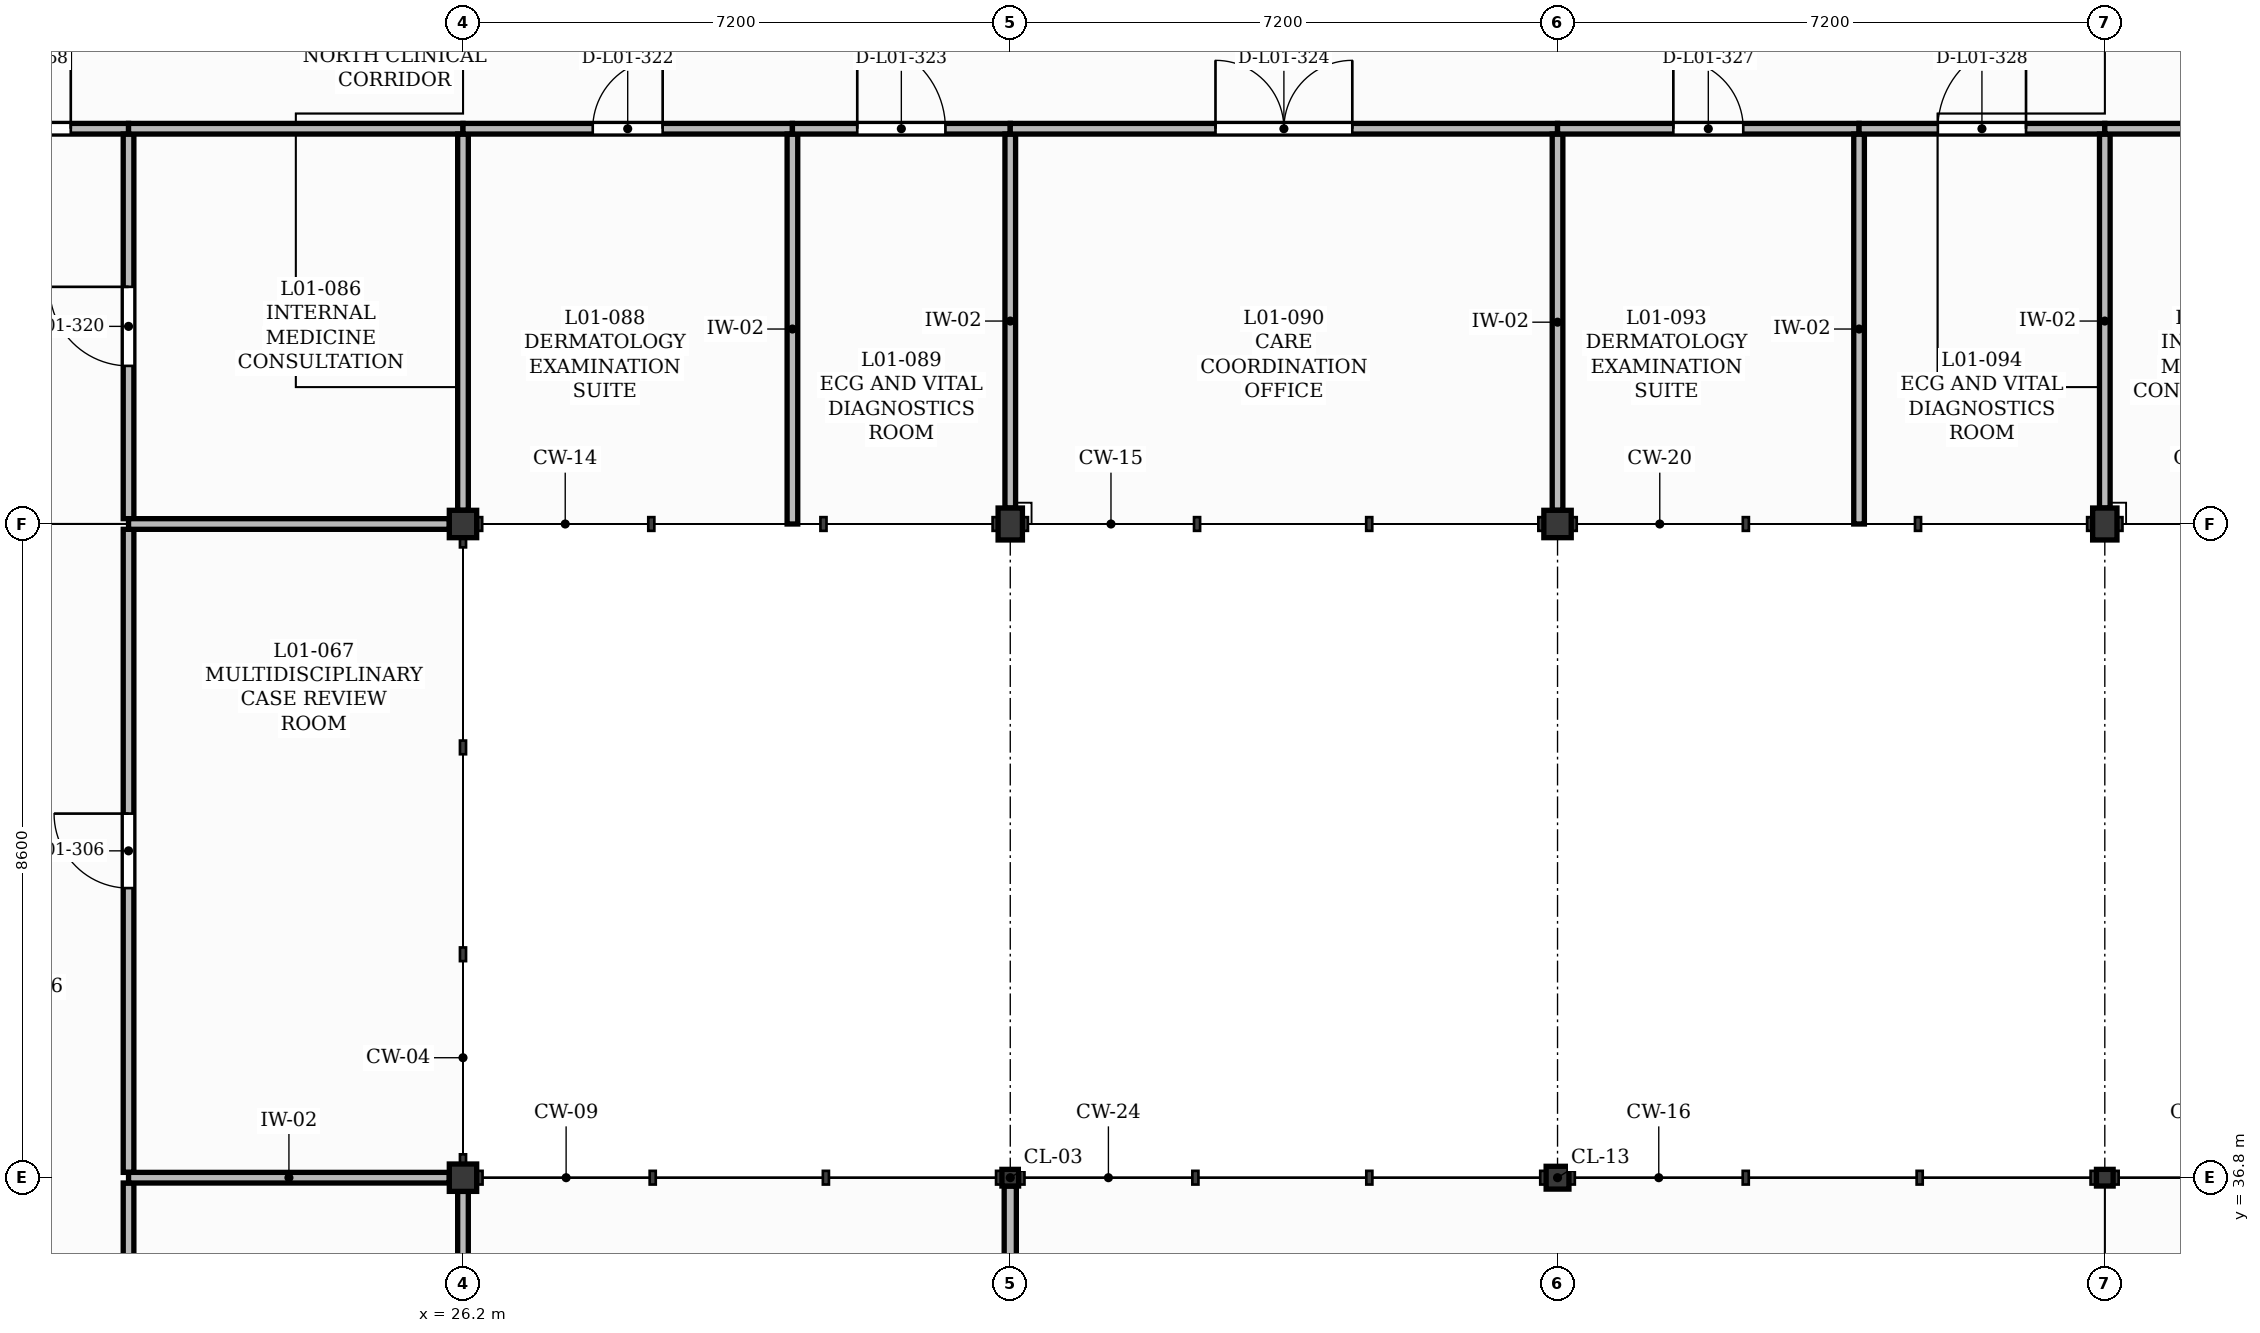
"""IFC4 building model, lengths in metres.
Left out: names, types, materials, properties, quantities, classifications, styles, units other than length and angle.
Written with IfcOpenShell. Run it as: python <this file> out.ifc"""

import sys

from ifc_helpers import new_model, si_unit, direction, frame, frame_2d, origin, origin_2d, place, context, subcontext, project, spatial, rectangle, hollow_circle, i_section, extrude, element, fill, save


model = new_model("IFC4")
c1 = context("Model", 3, precision=1e-05, world=origin(), true_north=direction((0.0, 1.0)))
c2 = subcontext(c1, "Body", "Model", "MODEL_VIEW")
j1 = project(units=[si_unit("LENGTHUNIT", "METRE"), si_unit("PLANEANGLEUNIT", "RADIAN")], contexts=[c1])
p1 = place(None, origin())
s1 = spatial("IfcSite", under=j1, at=p1, CompositionType="ELEMENT")
p2 = place(p1, origin())
s2 = spatial("IfcBuilding", under=s1, at=p2, CompositionType="ELEMENT")
p3 = place(p2, frame((0.0, 0.0, 4.5)))
s3 = spatial("IfcBuildingStorey", under=s2, at=p3, CompositionType="ELEMENT", Elevation=4.5)
for number, where, z_axis, x_axis in (
    (1, (26.2, 36.8, 0.0), (0.0, 0.0, 1.0), (1.0, 0.0, 0.0)),
    (2, (26.2, 45.4, 0.0), (0.0, 0.0, 1.0), (1.0, 0.0, 0.0)),
):
    element("IfcColumn", number, at=place(p3, frame(where, z_axis=z_axis, x_axis=x_axis)), inside=s3, PredefinedType="COLUMN", context=c2, shape_type="SweptSolid", body=[
        extrude(rectangle(XDim=0.36, YDim=0.36, at=origin_2d()), origin(), (0.0, 0.0, 1.0), 4.26),
    ])
p4 = place(p3, frame((33.4, 36.8, 0.0), z_axis=(0.0, 0.0, 1.0), x_axis=(1.0, 0.0, 0.0)))
e3 = element("IfcColumn", 3, at=p4, inside=s3, PredefinedType="COLUMN", context=c2, shape_type="SweptSolid", body=[
    extrude(hollow_circle(Radius=0.11, WallThickness=0.01, at=origin_2d()), origin(), (0.0, 0.0, 1.0), 4.3),
])
p5 = place(p3, frame((33.4, 45.4, 0.0), z_axis=(0.0, 0.0, 1.0), x_axis=(1.0, 0.0, 0.0)))
e4 = element("IfcColumn", 4, at=p5, inside=s3, PredefinedType="COLUMN", context=c2, shape_type="SweptSolid", body=[
    extrude(rectangle(XDim=0.32, YDim=0.42, at=origin_2d()), origin(), (0.0, 0.0, 1.0), 4.26),
])
p6 = place(p3, frame((40.6, 36.8, 0.0), z_axis=(0.0, 0.0, 1.0), x_axis=(1.0, 0.0, 0.0)))
e5 = element("IfcColumn", 5, at=p6, inside=s3, PredefinedType="COLUMN", context=c2, shape_type="SweptSolid", body=[
    extrude(i_section(OverallWidth=0.3, OverallDepth=0.3, WebThickness=0.011, FlangeThickness=0.019, FilletRadius=0.027, at=origin_2d()), origin(), (0.0, 0.0, 1.0), 4.3),
])
p7 = place(p3, frame((40.6, 45.4, 0.0), z_axis=(0.0, 0.0, 1.0), x_axis=(1.0, 0.0, 0.0)))
e6 = element("IfcColumn", 6, at=p7, inside=s3, PredefinedType="COLUMN", context=c2, shape_type="SweptSolid", body=[
    extrude(rectangle(XDim=0.36, YDim=0.36, at=origin_2d()), origin(), (0.0, 0.0, 1.0), 4.26),
])
p8 = place(p3, frame((47.8, 36.8, 0.0), z_axis=(0.0, 0.0, 1.0), x_axis=(1.0, 0.0, 0.0)))
e7 = element("IfcColumn", 7, at=p8, inside=s3, PredefinedType="COLUMN", context=c2, shape_type="SweptSolid", body=[
    extrude(hollow_circle(Radius=0.11, WallThickness=0.01, at=origin_2d()), origin(), (0.0, 0.0, 1.0), 4.3),
])
p9 = place(p3, frame((47.8, 45.4, 0.0), z_axis=(0.0, 0.0, 1.0), x_axis=(1.0, 0.0, 0.0)))
e8 = element("IfcColumn", 8, at=p9, inside=s3, PredefinedType="COLUMN", context=c2, shape_type="SweptSolid", body=[
    extrude(rectangle(XDim=0.32, YDim=0.42, at=origin_2d()), origin(), (0.0, 0.0, 1.0), 4.26),
])
p10 = place(p3, frame((19.0, 50.6, 0.0), z_axis=(0.0, 0.0, 1.0), x_axis=(1.0, 0.0, 0.0)))
e9 = element("IfcWall", 9, at=p10, inside=s3, PredefinedType="PARTITIONING", context=c2, shape_type="SweptSolid", body=[
    extrude(rectangle(XDim=2.8, YDim=0.14, at=frame_2d((1.4, 0.0))), origin(), (0.0, 0.0, 1.0), 4.18),
])
p11 = place(p10, frame((0.76, 0.0, 0.0)))
e10 = element("IfcOpeningElement", 10, at=p11, cuts=e9, PredefinedType="OPENING", context=c2, shape_type="SweptSolid", body=[
    extrude(rectangle(XDim=1.28, YDim=2.2, at=frame_2d((0.64, 1.1))), frame((0.0, 0.08, 0.0), z_axis=(0.0, -1.0, 0.0), x_axis=(1.0, 0.0, 0.0)), (0.0, 0.0, 1.0), 0.16),
])
p12 = place(p3, frame((21.8, 27.27, 0.0), z_axis=(0.0, 0.0, 1.0), x_axis=(0.0, 1.0, 0.0)))
e11 = element("IfcWall", 11, at=p12, inside=s3, PredefinedType="PARTITIONING", context=c2, shape_type="SweptSolid", body=[
    extrude(rectangle(XDim=9.46, YDim=0.14, at=frame_2d((4.73, 0.0))), origin(), (0.0, 0.0, 1.0), 4.18),
])
p13 = place(p12, frame((4.09, 0.0, 0.0)))
e12 = element("IfcOpeningElement", 12, at=p13, cuts=e11, PredefinedType="OPENING", context=c2, shape_type="SweptSolid", body=[
    extrude(rectangle(XDim=1.28, YDim=2.2, at=frame_2d((0.64, 1.1))), frame((0.0, 0.08, 0.0), z_axis=(0.0, -1.0, 0.0), x_axis=(1.0, 0.0, 0.0)), (0.0, 0.0, 1.0), 0.16),
])
p14 = place(p3, frame((21.8, 36.87, 0.0), z_axis=(0.0, 0.0, 1.0), x_axis=(0.0, 1.0, 0.0)))
e13 = element("IfcWall", 13, at=p14, inside=s3, PredefinedType="PARTITIONING", context=c2, shape_type="SweptSolid", body=[
    extrude(rectangle(XDim=8.46, YDim=0.14, at=frame_2d((4.23, 0.0))), origin(), (0.0, 0.0, 1.0), 4.18),
])
p15 = place(p14, frame((3.74, 0.0, 0.0)))
e14 = element("IfcOpeningElement", 14, at=p15, cuts=e13, PredefinedType="OPENING", context=c2, shape_type="SweptSolid", body=[
    extrude(rectangle(XDim=0.98, YDim=2.15, at=frame_2d((0.49, 1.075))), frame((0.0, 0.08, 0.0), z_axis=(0.0, -1.0, 0.0), x_axis=(1.0, 0.0, 0.0)), (0.0, 0.0, 1.0), 0.16),
])
p16 = place(p3, frame((21.8, 36.8, 0.0), z_axis=(0.0, 0.0, 1.0), x_axis=(1.0, 0.0, 0.0)))
e15 = element("IfcWall", 15, at=p16, inside=s3, PredefinedType="PARTITIONING", context=c2, shape_type="SweptSolid", body=[
    extrude(rectangle(XDim=4.22, YDim=0.14, at=frame_2d((2.11, 0.0))), origin(), (0.0, 0.0, 1.0), 3.62),
])
p17 = place(p3, frame((21.8, 45.47, 0.0), z_axis=(0.0, 0.0, 1.0), x_axis=(0.0, 1.0, 0.0)))
e16 = element("IfcWall", 16, at=p17, inside=s3, PredefinedType="PARTITIONING", context=c2, shape_type="SweptSolid", body=[
    extrude(rectangle(XDim=5.06, YDim=0.14, at=frame_2d((2.53, 0.0))), origin(), (0.0, 0.0, 1.0), 4.18),
])
p18 = place(p17, frame((2.01, 0.0, 0.0)))
e17 = element("IfcOpeningElement", 17, at=p18, cuts=e16, PredefinedType="OPENING", context=c2, shape_type="SweptSolid", body=[
    extrude(rectangle(XDim=1.04, YDim=2.1, at=frame_2d((0.52, 1.05))), frame((0.0, 0.08, 0.0), z_axis=(0.0, -1.0, 0.0), x_axis=(1.0, 0.0, 0.0)), (0.0, 0.0, 1.0), 0.16),
])
p19 = place(p3, frame((21.8, 45.4, 0.0), z_axis=(0.0, 0.0, 1.0), x_axis=(1.0, 0.0, 0.0)))
e18 = element("IfcWall", 18, at=p19, inside=s3, PredefinedType="PARTITIONING", context=c2, shape_type="SweptSolid", body=[
    extrude(rectangle(XDim=4.22, YDim=0.14, at=frame_2d((2.11, 0.0))), origin(), (0.0, 0.0, 1.0), 3.66),
])
p20 = place(p3, frame((21.8, 50.6, 0.0), z_axis=(0.0, 0.0, 1.0), x_axis=(1.0, 0.0, 0.0)))
e19 = element("IfcWall", 19, at=p20, inside=s3, PredefinedType="PARTITIONING", context=c2, shape_type="SweptSolid", body=[
    extrude(rectangle(XDim=4.4, YDim=0.14, at=frame_2d((2.2, 0.0))), origin(), (0.0, 0.0, 1.0), 4.18),
])
p21 = place(p3, frame((26.2, 27.38, 0.0), z_axis=(0.0, 0.0, 1.0), x_axis=(0.0, 1.0, 0.0)))
e20 = element("IfcWall", 20, at=p21, inside=s3, PredefinedType="PARTITIONING", context=c2, shape_type="SweptSolid", body=[
    extrude(rectangle(XDim=9.24, YDim=0.14, at=frame_2d((4.62, 0.0))), origin(), (0.0, 0.0, 1.0), 3.97),
])
p22 = place(p21, frame((3.98, 0.0, 0.0)))
e21 = element("IfcOpeningElement", 21, at=p22, cuts=e20, PredefinedType="OPENING", context=c2, shape_type="SweptSolid", body=[
    extrude(rectangle(XDim=1.28, YDim=2.2, at=frame_2d((0.64, 1.1))), frame((0.0, 0.08, 0.0), z_axis=(0.0, -1.0, 0.0), x_axis=(1.0, 0.0, 0.0)), (0.0, 0.0, 1.0), 0.16),
])
p23 = place(p3, frame((26.2, 45.58, 0.0), z_axis=(0.0, 0.0, 1.0), x_axis=(0.0, 1.0, 0.0)))
e22 = element("IfcWall", 22, at=p23, inside=s3, PredefinedType="PARTITIONING", context=c2, shape_type="SweptSolid", body=[
    extrude(rectangle(XDim=4.95, YDim=0.14, at=frame_2d((2.475, 0.0))), origin(), (0.0, 0.0, 1.0), 3.74),
])
p24 = place(p3, frame((26.2, 50.6, 0.0), z_axis=(0.0, 0.0, 1.0), x_axis=(1.0, 0.0, 0.0)))
e23 = element("IfcWall", 23, at=p24, inside=s3, PredefinedType="PARTITIONING", context=c2, shape_type="SweptSolid", body=[
    extrude(rectangle(XDim=4.334, YDim=0.14, at=frame_2d((2.167, 0.0))), origin(), (0.0, 0.0, 1.0), 4.18),
])
p25 = place(p24, frame((1.707, 0.0, 0.0)))
e24 = element("IfcOpeningElement", 24, at=p25, cuts=e23, PredefinedType="OPENING", context=c2, shape_type="SweptSolid", body=[
    extrude(rectangle(XDim=0.92, YDim=2.1, at=frame_2d((0.46, 1.05))), frame((0.0, 0.08, 0.0), z_axis=(0.0, -1.0, 0.0), x_axis=(1.0, 0.0, 0.0)), (0.0, 0.0, 1.0), 0.16),
])
p26 = place(p3, frame((30.534, 45.4, 0.0), z_axis=(0.0, 0.0, 1.0), x_axis=(0.0, 1.0, 0.0)))
e25 = element("IfcWall", 25, at=p26, inside=s3, PredefinedType="PARTITIONING", context=c2, shape_type="SweptSolid", body=[
    extrude(rectangle(XDim=5.13, YDim=0.14, at=frame_2d((2.565, 0.0))), origin(), (0.0, 0.0, 1.0), 4.18),
])
p27 = place(p3, frame((30.534, 50.6, 0.0), z_axis=(0.0, 0.0, 1.0), x_axis=(1.0, 0.0, 0.0)))
e26 = element("IfcWall", 26, at=p27, inside=s3, PredefinedType="PARTITIONING", context=c2, shape_type="SweptSolid", body=[
    extrude(rectangle(XDim=2.866, YDim=0.14, at=frame_2d((1.433, 0.0))), origin(), (0.0, 0.0, 1.0), 4.18),
])
p28 = place(p27, frame((0.853, 0.0, 0.0)))
e27 = element("IfcOpeningElement", 27, at=p28, cuts=e26, PredefinedType="OPENING", context=c2, shape_type="SweptSolid", body=[
    extrude(rectangle(XDim=1.16, YDim=2.1, at=frame_2d((0.58, 1.05))), frame((0.0, 0.08, 0.0), z_axis=(0.0, -1.0, 0.0), x_axis=(1.0, 0.0, 0.0)), (0.0, 0.0, 1.0), 0.16),
])
p29 = place(p3, frame((33.4, 45.61, 0.0), z_axis=(0.0, 0.0, 1.0), x_axis=(0.0, 1.0, 0.0)))
e28 = element("IfcWall", 28, at=p29, inside=s3, PredefinedType="PARTITIONING", context=c2, shape_type="SweptSolid", body=[
    extrude(rectangle(XDim=4.92, YDim=0.14, at=frame_2d((2.46, 0.0))), origin(), (0.0, 0.0, 1.0), 3.74),
])
p30 = place(p3, frame((33.4, 50.6, 0.0), z_axis=(0.0, 0.0, 1.0), x_axis=(1.0, 0.0, 0.0)))
e29 = element("IfcWall", 29, at=p30, inside=s3, PredefinedType="PARTITIONING", context=c2, shape_type="SweptSolid", body=[
    extrude(rectangle(XDim=7.2, YDim=0.14, at=frame_2d((3.6, 0.0))), origin(), (0.0, 0.0, 1.0), 4.18),
])
p31 = place(p30, frame((2.7, 0.0, 0.0)))
e30 = element("IfcOpeningElement", 30, at=p31, cuts=e29, PredefinedType="OPENING", context=c2, shape_type="SweptSolid", body=[
    extrude(rectangle(XDim=1.8, YDim=2.3, at=frame_2d((0.9, 1.15))), frame((0.0, 0.08, 0.0), z_axis=(0.0, -1.0, 0.0), x_axis=(1.0, 0.0, 0.0)), (0.0, 0.0, 1.0), 0.16),
])
p32 = place(p3, frame((40.6, 45.58, 0.0), z_axis=(0.0, 0.0, 1.0), x_axis=(0.0, 1.0, 0.0)))
e31 = element("IfcWall", 31, at=p32, inside=s3, PredefinedType="PARTITIONING", context=c2, shape_type="SweptSolid", body=[
    extrude(rectangle(XDim=4.95, YDim=0.14, at=frame_2d((2.475, 0.0))), origin(), (0.0, 0.0, 1.0), 3.74),
])
p33 = place(p3, frame((40.6, 50.6, 0.0), z_axis=(0.0, 0.0, 1.0), x_axis=(1.0, 0.0, 0.0)))
e32 = element("IfcWall", 32, at=p33, inside=s3, PredefinedType="PARTITIONING", context=c2, shape_type="SweptSolid", body=[
    extrude(rectangle(XDim=3.967, YDim=0.14, at=frame_2d((1.983, 0.0))), origin(), (0.0, 0.0, 1.0), 4.18),
])
p34 = place(p33, frame((1.523, 0.0, 0.0)))
e33 = element("IfcOpeningElement", 33, at=p34, cuts=e32, PredefinedType="OPENING", context=c2, shape_type="SweptSolid", body=[
    extrude(rectangle(XDim=0.92, YDim=2.1, at=frame_2d((0.46, 1.05))), frame((0.0, 0.08, 0.0), z_axis=(0.0, -1.0, 0.0), x_axis=(1.0, 0.0, 0.0)), (0.0, 0.0, 1.0), 0.16),
])
p35 = place(p3, frame((44.567, 45.4, 0.0), z_axis=(0.0, 0.0, 1.0), x_axis=(0.0, 1.0, 0.0)))
e34 = element("IfcWall", 34, at=p35, inside=s3, PredefinedType="PARTITIONING", context=c2, shape_type="SweptSolid", body=[
    extrude(rectangle(XDim=5.13, YDim=0.14, at=frame_2d((2.565, 0.0))), origin(), (0.0, 0.0, 1.0), 4.18),
])
p36 = place(p3, frame((44.567, 50.6, 0.0), z_axis=(0.0, 0.0, 1.0), x_axis=(1.0, 0.0, 0.0)))
e35 = element("IfcWall", 35, at=p36, inside=s3, PredefinedType="PARTITIONING", context=c2, shape_type="SweptSolid", body=[
    extrude(rectangle(XDim=3.233, YDim=0.14, at=frame_2d((1.617, 0.0))), origin(), (0.0, 0.0, 1.0), 4.18),
])
p37 = place(p36, frame((1.037, 0.0, 0.0)))
e36 = element("IfcOpeningElement", 36, at=p37, cuts=e35, PredefinedType="OPENING", context=c2, shape_type="SweptSolid", body=[
    extrude(rectangle(XDim=1.16, YDim=2.1, at=frame_2d((0.58, 1.05))), frame((0.0, 0.08, 0.0), z_axis=(0.0, -1.0, 0.0), x_axis=(1.0, 0.0, 0.0)), (0.0, 0.0, 1.0), 0.16),
])
p38 = place(p3, frame((47.8, 45.61, 0.0), z_axis=(0.0, 0.0, 1.0), x_axis=(0.0, 1.0, 0.0)))
e37 = element("IfcWall", 37, at=p38, inside=s3, PredefinedType="PARTITIONING", context=c2, shape_type="SweptSolid", body=[
    extrude(rectangle(XDim=4.92, YDim=0.14, at=frame_2d((2.46, 0.0))), origin(), (0.0, 0.0, 1.0), 3.74),
])
p39 = place(p3, frame((47.8, 50.6, 0.0), z_axis=(0.0, 0.0, 1.0), x_axis=(1.0, 0.0, 0.0)))
e38 = element("IfcWall", 38, at=p39, inside=s3, PredefinedType="PARTITIONING", context=c2, shape_type="SweptSolid", body=[
    extrude(rectangle(XDim=4.025, YDim=0.14, at=frame_2d((2.012, 0.0))), origin(), (0.0, 0.0, 1.0), 4.18),
])
p40 = place(p39, frame((1.492, 0.0, 0.0)))
e39 = element("IfcOpeningElement", 39, at=p40, cuts=e38, PredefinedType="OPENING", context=c2, shape_type="SweptSolid", body=[
    extrude(rectangle(XDim=1.04, YDim=2.1, at=frame_2d((0.52, 1.05))), frame((0.0, 0.08, 0.0), z_axis=(0.0, -1.0, 0.0), x_axis=(1.0, 0.0, 0.0)), (0.0, 0.0, 1.0), 0.16),
])
p41 = place(p3, frame((33.4, 27.31, 0.0), z_axis=(0.0, 0.0, 1.0), x_axis=(0.0, 1.0, 0.0)))
e40 = element("IfcWall", 40, at=p41, inside=s3, PredefinedType="PARTITIONING", context=c2, shape_type="SweptSolid", body=[
    extrude(rectangle(XDim=9.381, YDim=0.16, at=frame_2d((4.69, 0.0))), origin(), (0.0, 0.0, 1.0), 4.18),
])
p42 = place(p11, origin())
e41 = element("IfcDoor", 41, at=p42, inside=s3, OperationType="SINGLE_SWING_RIGHT", PredefinedType="DOOR", context=c2, shape_type="SweptSolid", body=[
    extrude(rectangle(XDim=1.28, YDim=2.2, at=frame_2d((0.64, 1.1))), frame((0.0, 0.025, 0.0), z_axis=(0.0, -1.0, 0.0), x_axis=(1.0, 0.0, 0.0)), (0.0, 0.0, 1.0), 0.05),
])
fill(e10, e41)
p43 = place(p15, origin())
e42 = element("IfcDoor", 42, at=p43, inside=s3, OperationType="SINGLE_SWING_RIGHT", PredefinedType="DOOR", context=c2, shape_type="SweptSolid", body=[
    extrude(rectangle(XDim=0.98, YDim=2.15, at=frame_2d((0.49, 1.075))), frame((0.0, 0.025, 0.0), z_axis=(0.0, -1.0, 0.0), x_axis=(1.0, 0.0, 0.0)), (0.0, 0.0, 1.0), 0.05),
])
fill(e14, e42)
p44 = place(p18, origin())
e43 = element("IfcDoor", 43, at=p44, inside=s3, OperationType="SINGLE_SWING_RIGHT", PredefinedType="DOOR", context=c2, shape_type="SweptSolid", body=[
    extrude(rectangle(XDim=1.04, YDim=2.1, at=frame_2d((0.52, 1.05))), frame((0.0, 0.025, 0.0), z_axis=(0.0, -1.0, 0.0), x_axis=(1.0, 0.0, 0.0)), (0.0, 0.0, 1.0), 0.05),
])
fill(e17, e43)
p45 = place(p25, origin())
e44 = element("IfcDoor", 44, at=p45, inside=s3, OperationType="SINGLE_SWING_RIGHT", PredefinedType="DOOR", context=c2, shape_type="SweptSolid", body=[
    extrude(rectangle(XDim=0.92, YDim=2.1, at=frame_2d((0.46, 1.05))), frame((0.0, 0.025, 0.0), z_axis=(0.0, -1.0, 0.0), x_axis=(1.0, 0.0, 0.0)), (0.0, 0.0, 1.0), 0.05),
])
fill(e24, e44)
p46 = place(p28, origin())
e45 = element("IfcDoor", 45, at=p46, inside=s3, OperationType="SINGLE_SWING_LEFT", PredefinedType="DOOR", context=c2, shape_type="SweptSolid", body=[
    extrude(rectangle(XDim=1.16, YDim=2.1, at=frame_2d((0.58, 1.05))), frame((0.0, 0.025, 0.0), z_axis=(0.0, -1.0, 0.0), x_axis=(1.0, 0.0, 0.0)), (0.0, 0.0, 1.0), 0.05),
])
fill(e27, e45)
p47 = place(p31, origin())
e46 = element("IfcDoor", 46, at=p47, inside=s3, OperationType="DOUBLE_DOOR_SINGLE_SWING", PredefinedType="DOOR", context=c2, shape_type="SweptSolid", body=[
    extrude(rectangle(XDim=1.8, YDim=2.3, at=frame_2d((0.9, 1.15))), frame((0.0, 0.025, 0.0), z_axis=(0.0, -1.0, 0.0), x_axis=(1.0, 0.0, 0.0)), (0.0, 0.0, 1.0), 0.05),
])
fill(e30, e46)
p48 = place(p34, origin())
e47 = element("IfcDoor", 47, at=p48, inside=s3, OperationType="SINGLE_SWING_LEFT", PredefinedType="DOOR", context=c2, shape_type="SweptSolid", body=[
    extrude(rectangle(XDim=0.92, YDim=2.1, at=frame_2d((0.46, 1.05))), frame((0.0, 0.025, 0.0), z_axis=(0.0, -1.0, 0.0), x_axis=(1.0, 0.0, 0.0)), (0.0, 0.0, 1.0), 0.05),
])
fill(e33, e47)
p49 = place(p37, origin())
e48 = element("IfcDoor", 48, at=p49, inside=s3, OperationType="SINGLE_SWING_RIGHT", PredefinedType="DOOR", context=c2, shape_type="SweptSolid", body=[
    extrude(rectangle(XDim=1.16, YDim=2.1, at=frame_2d((0.58, 1.05))), frame((0.0, 0.025, 0.0), z_axis=(0.0, -1.0, 0.0), x_axis=(1.0, 0.0, 0.0)), (0.0, 0.0, 1.0), 0.05),
])
fill(e36, e48)
save(model, sys.argv[1])
